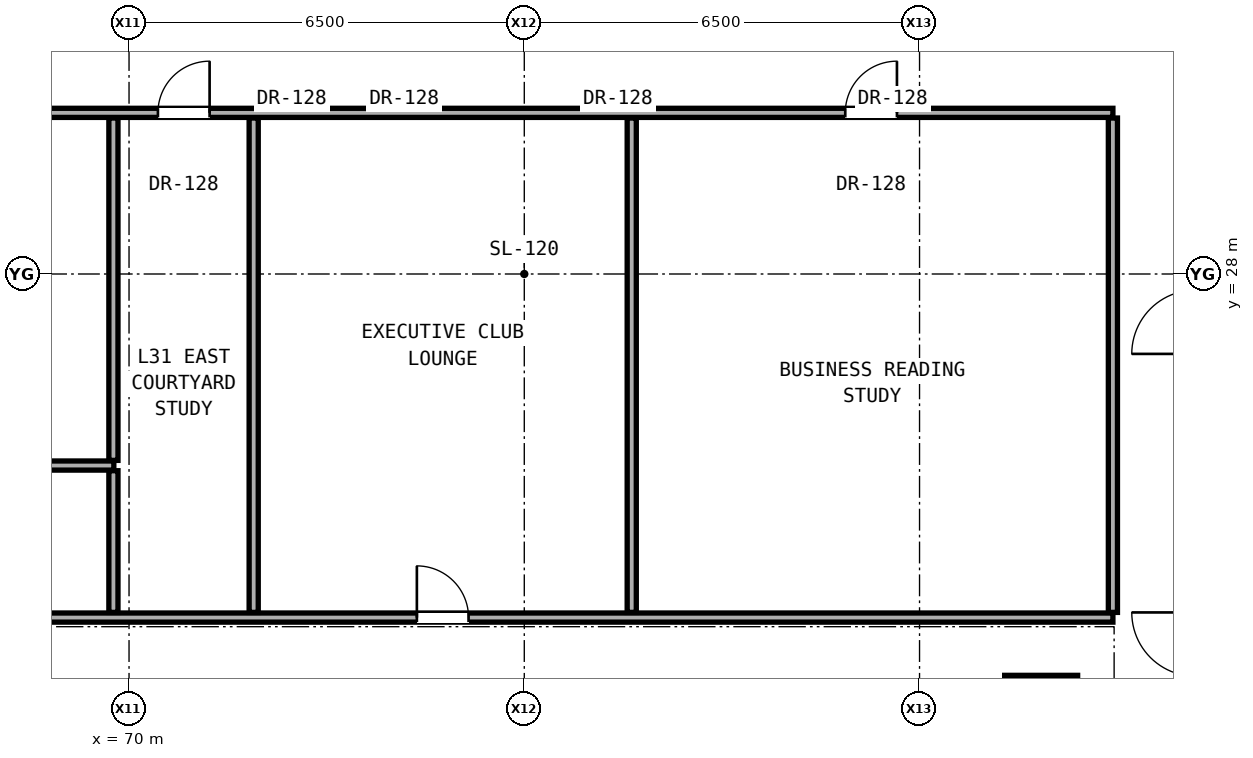
"""IFC4 building model, lengths in metres.
Left out: names, types, materials, properties, quantities, classifications, styles, units other than length and angle.
Written with IfcOpenShell. Run it as: python <this file> out.ifc"""

import sys

from ifc_helpers import new_model, si_unit, direction, frame, frame_2d, origin, origin_2d, place, context, subcontext, project, spatial, rectangle, extrude, element, fill, save


model = new_model("IFC4")
c1 = context("Model", 3, precision=1e-05, world=origin(), true_north=direction((0.0, 1.0)))
c2 = subcontext(c1, "Body", "Model", "MODEL_VIEW")
j1 = project(units=[si_unit("LENGTHUNIT", "METRE"), si_unit("PLANEANGLEUNIT", "RADIAN")], contexts=[c1])
p1 = place(None, origin())
s1 = spatial("IfcSite", under=j1, at=p1, CompositionType="ELEMENT")
p2 = place(p1, origin())
s2 = spatial("IfcBuilding", under=s1, at=p2, CompositionType="ELEMENT")
p3 = place(p2, frame((0.0, 0.0, 111.5)))
s3 = spatial("IfcBuildingStorey", under=s2, at=p3, CompositionType="ELEMENT", Elevation=111.5)
p4 = place(p3, frame((85.0, 20.8, 0.0), z_axis=(0.0, 0.0, 1.0), x_axis=(1.0, 0.0, 0.0)))
e1 = element("IfcColumn", 1, at=p4, inside=s3, PredefinedType="COLUMN", context=c2, shape_type="SweptSolid", body=[
    extrude(rectangle(XDim=1.2, YDim=1.2, at=origin_2d()), origin(), (0.0, 0.0, 1.0), 3.3),
])
p5 = place(p3, frame((66.68, 22.35, 0.0), z_axis=(0.0, 0.0, 1.0), x_axis=(1.0, 0.0, 0.0)))
e2 = element("IfcWall", 2, at=p5, inside=s3, PredefinedType="PARTITIONING", context=c2, shape_type="SweptSolid", body=[
    extrude(rectangle(XDim=19.5, YDim=0.15, at=frame_2d((9.75, 0.0))), origin(), (0.0, 0.0, 1.0), 2.145),
])
p6 = place(p5, frame((8.053, 0.0, 0.0)))
e3 = element("IfcOpeningElement", 3, at=p6, cuts=e2, PredefinedType="OPENING", context=c2, shape_type="SweptSolid", body=[
    extrude(rectangle(XDim=0.85, YDim=2.01, at=frame_2d((0.425, 1.005))), frame((0.0, 0.085, 0.0), z_axis=(0.0, -1.0, 0.0), x_axis=(1.0, 0.0, 0.0)), (0.0, 0.0, 1.0), 0.17),
])
p7 = place(p3, frame((66.68, 24.85, 0.0), z_axis=(0.0, 0.0, 1.0), x_axis=(1.0, 0.0, 0.0)))
e4 = element("IfcWall", 4, at=p7, inside=s3, PredefinedType="PARTITIONING", context=c2, shape_type="SweptSolid", body=[
    extrude(rectangle(XDim=3.07, YDim=0.15, at=frame_2d((1.535, 0.0))), origin(), (0.0, 0.0, 1.0), 2.145),
])
p8 = place(p3, frame((66.68, 30.65, 0.0), z_axis=(0.0, 0.0, 1.0), x_axis=(1.0, 0.0, 0.0)))
e5 = element("IfcWall", 5, at=p8, inside=s3, PredefinedType="PARTITIONING", context=c2, shape_type="SweptSolid", body=[
    extrude(rectangle(XDim=19.5, YDim=0.15, at=frame_2d((9.75, 0.0))), origin(), (0.0, 0.0, 1.0), 2.145),
])
p9 = place(p8, frame((3.795, 0.0, 0.0)))
e6 = element("IfcOpeningElement", 6, at=p9, cuts=e5, PredefinedType="OPENING", context=c2, shape_type="SweptSolid", body=[
    extrude(rectangle(XDim=0.85, YDim=2.01, at=frame_2d((0.425, 1.005))), frame((0.0, 0.085, 0.0), z_axis=(0.0, -1.0, 0.0), x_axis=(1.0, 0.0, 0.0)), (0.0, 0.0, 1.0), 0.17),
])
p10 = place(p8, frame((15.098, 0.0, 0.0)))
e7 = element("IfcOpeningElement", 7, at=p10, cuts=e5, PredefinedType="OPENING", context=c2, shape_type="SweptSolid", body=[
    extrude(rectangle(XDim=0.85, YDim=2.01, at=frame_2d((0.425, 1.005))), frame((0.0, 0.085, 0.0), z_axis=(0.0, -1.0, 0.0), x_axis=(1.0, 0.0, 0.0)), (0.0, 0.0, 1.0), 0.17),
])
p11 = place(p3, frame((69.743, 22.435, 0.0), z_axis=(0.0, 0.0, 1.0), x_axis=(0.0, 1.0, 0.0)))
e8 = element("IfcWall", 8, at=p11, inside=s3, PredefinedType="PARTITIONING", context=c2, shape_type="SweptSolid", body=[
    extrude(rectangle(XDim=2.33, YDim=0.15, at=frame_2d((1.165, 0.0))), origin(), (0.0, 0.0, 1.0), 3.08),
])
p12 = place(p3, frame((69.743, 24.935, 0.0), z_axis=(0.0, 0.0, 1.0), x_axis=(0.0, 1.0, 0.0)))
e9 = element("IfcWall", 9, at=p12, inside=s3, PredefinedType="PARTITIONING", context=c2, shape_type="SweptSolid", body=[
    extrude(rectangle(XDim=5.63, YDim=0.15, at=frame_2d((2.815, 0.0))), origin(), (0.0, 0.0, 1.0), 2.145),
])
for number, where, z_axis, x_axis in (
    (10, (72.05, 22.435, 0.0), (0.0, 0.0, 1.0), (0.0, 1.0, 0.0)),
    (11, (78.267, 22.435, 0.0), (0.0, 0.0, 1.0), (0.0, 1.0, 0.0)),
):
    element("IfcWall", number, at=place(p3, frame(where, z_axis=z_axis, x_axis=x_axis)), inside=s3, PredefinedType="PARTITIONING", context=c2, shape_type="SweptSolid", body=[
        extrude(rectangle(XDim=8.13, YDim=0.15, at=frame_2d((4.065, 0.0))), origin(), (0.0, 0.0, 1.0), 2.145),
    ])
p13 = place(p3, frame((86.18, 22.435, 0.0), z_axis=(0.0, 0.0, 1.0), x_axis=(0.0, 1.0, 0.0)))
e12 = element("IfcWall", 12, at=p13, inside=s3, PredefinedType="PARTITIONING", context=c2, shape_type="SweptSolid", body=[
    extrude(rectangle(XDim=8.13, YDim=0.15, at=frame_2d((4.065, 0.0))), origin(), (0.0, 0.0, 1.0), 2.299),
])
p14 = place(p9, origin())
e13 = element("IfcDoor", 13, at=p14, inside=s3, OperationType="SINGLE_SWING_RIGHT", PredefinedType="DOOR", context=c2, shape_type="SweptSolid", body=[
    extrude(rectangle(XDim=0.85, YDim=2.01, at=frame_2d((0.425, 1.005))), frame((0.0, 0.025, 0.0), z_axis=(0.0, -1.0, 0.0), x_axis=(1.0, 0.0, 0.0)), (0.0, 0.0, 1.0), 0.05),
])
fill(e6, e13)
p15 = place(p6, origin())
e14 = element("IfcDoor", 14, at=p15, inside=s3, OperationType="SINGLE_SWING_LEFT", PredefinedType="DOOR", context=c2, shape_type="SweptSolid", body=[
    extrude(rectangle(XDim=0.85, YDim=2.01, at=frame_2d((0.425, 1.005))), frame((0.0, 0.025, 0.0), z_axis=(0.0, -1.0, 0.0), x_axis=(1.0, 0.0, 0.0)), (0.0, 0.0, 1.0), 0.05),
])
fill(e3, e14)
p16 = place(p10, origin())
e15 = element("IfcDoor", 15, at=p16, inside=s3, OperationType="SINGLE_SWING_RIGHT", PredefinedType="DOOR", context=c2, shape_type="SweptSolid", body=[
    extrude(rectangle(XDim=0.85, YDim=2.01, at=frame_2d((0.425, 1.005))), frame((0.0, 0.025, 0.0), z_axis=(0.0, -1.0, 0.0), x_axis=(1.0, 0.0, 0.0)), (0.0, 0.0, 1.0), 0.05),
])
fill(e7, e15)
save(model, sys.argv[1])
